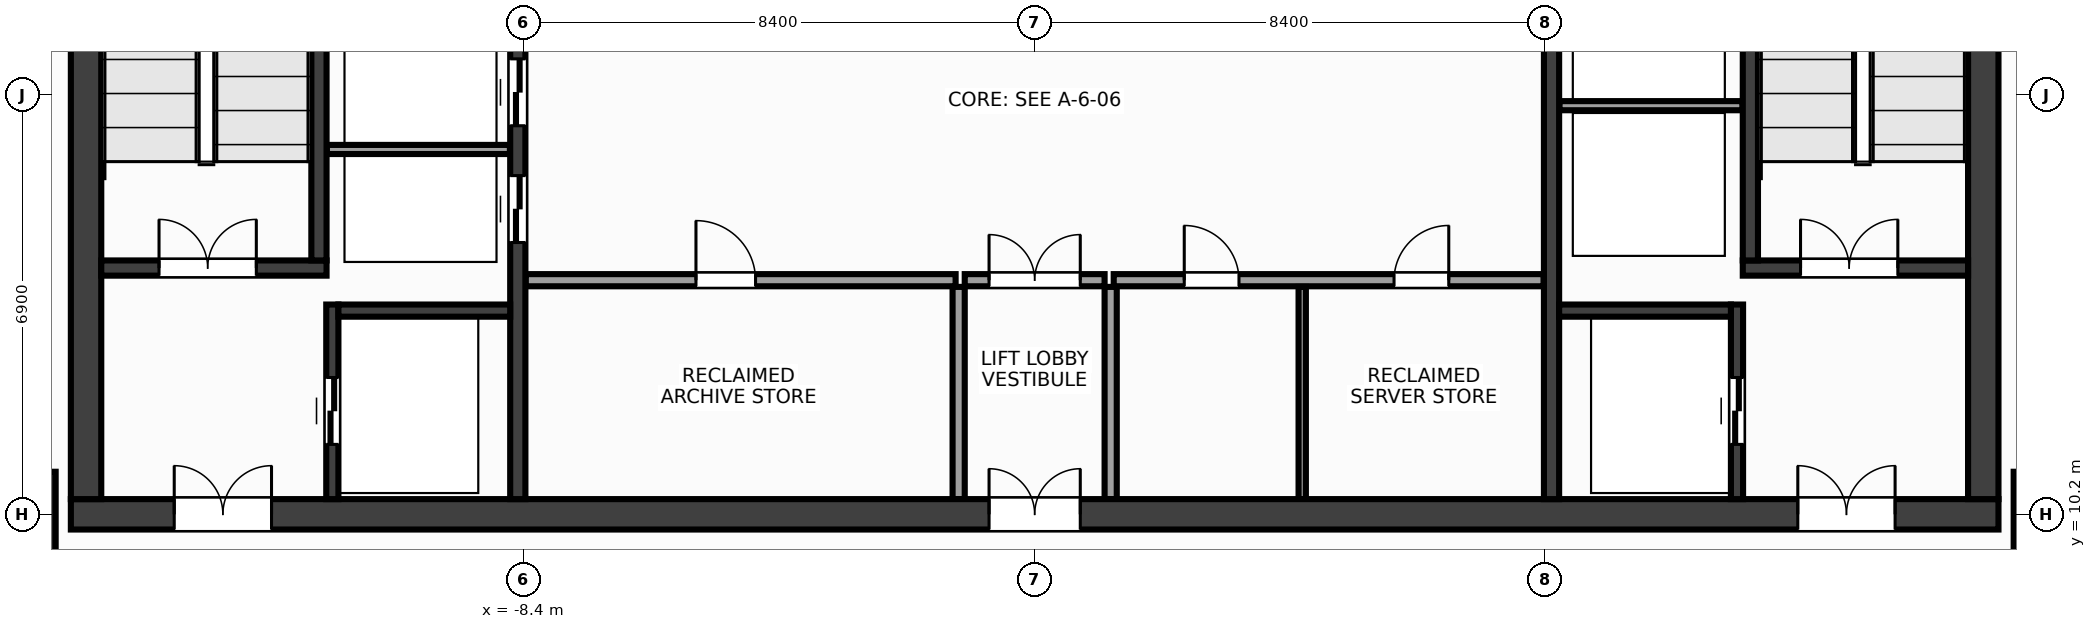
"""IFC4 building model, lengths in metres.
Left out: names, types, materials, properties, quantities, classifications, styles, units other than length and angle.
Written with IfcOpenShell. Run it as: python <this file> out.ifc"""

import sys

from ifc_helpers import new_model, si_unit, direction, frame, frame_2d, origin, origin_2d, place, context, subcontext, project, spatial, rectangle, extrude, source, transform, mapped, element, fill, save


model = new_model("IFC4")
c1 = context("Model", 3, precision=1e-05, world=origin(), true_north=direction((0.0, 1.0)))
c2 = subcontext(c1, "Body", "Model", "MODEL_VIEW")
j1 = project(units=[si_unit("LENGTHUNIT", "METRE"), si_unit("PLANEANGLEUNIT", "RADIAN")], contexts=[c1])
p1 = place(None, origin())
s1 = spatial("IfcSite", under=j1, at=p1, CompositionType="ELEMENT")
p2 = place(p1, origin())
s2 = spatial("IfcBuilding", under=s1, at=p2, CompositionType="ELEMENT")
p3 = place(p2, frame((0.0, 0.0, 218.0)))
s3 = spatial("IfcBuildingStorey", under=s2, at=p3, CompositionType="ELEMENT", Elevation=218.0)
m1 = source(origin(), c2, "Body", "SweptSolid", [
    extrude(rectangle(XDim=31.7, YDim=0.5, at=frame_2d((15.85, 0.0))), origin(), (0.0, 0.0, 1.0), 3.6),
])
p4 = place(p3, frame((-15.85, 10.2, 0.0), z_axis=(0.0, 0.0, 1.0), x_axis=(1.0, 0.0, 0.0)))
e1 = element("IfcWall", 1, at=p4, inside=s3, PredefinedType="SHEAR", context=c2, shape_type="MappedRepresentation", body=[
    mapped(m1, transform((0.0, 0.0, 0.0), x_axis=(1.0, 0.0, 0.0), y_axis=(0.0, 1.0, 0.0), z_axis=(0.0, 0.0, 1.0), scale=1.0)),
])
p5 = place(p4, frame((1.7, 0.0, 0.0)))
e2 = element("IfcOpeningElement", 2, at=p5, cuts=e1, PredefinedType="OPENING", context=c2, shape_type="SweptSolid", body=[
    extrude(rectangle(XDim=1.6, YDim=2.15, at=frame_2d((0.8, 1.075))), frame((0.0, 0.262, 0.0), z_axis=(0.0, -1.0, 0.0), x_axis=(1.0, 0.0, 0.0)), (0.0, 0.0, 1.0), 0.524),
])
p6 = place(p4, frame((28.4, 0.0, 0.0)))
e3 = element("IfcOpeningElement", 3, at=p6, cuts=e1, PredefinedType="OPENING", context=c2, shape_type="SweptSolid", body=[
    extrude(rectangle(XDim=1.6, YDim=2.15, at=frame_2d((0.8, 1.075))), frame((0.0, 0.262, 0.0), z_axis=(0.0, -1.0, 0.0), x_axis=(1.0, 0.0, 0.0)), (0.0, 0.0, 1.0), 0.524),
])
p7 = place(p4, frame((15.1, 0.0, 0.0)))
e4 = element("IfcOpeningElement", 4, at=p7, cuts=e1, PredefinedType="OPENING", context=c2, shape_type="SweptSolid", body=[
    extrude(rectangle(XDim=1.5, YDim=2.2, at=frame_2d((0.75, 1.1))), frame((0.0, 0.262, 0.0), z_axis=(0.0, -1.0, 0.0), x_axis=(1.0, 0.0, 0.0)), (0.0, 0.0, 1.0), 0.524),
])
m2 = source(origin(), c2, "Body", "SweptSolid", [
    extrude(rectangle(XDim=13.1, YDim=0.5, at=frame_2d((6.55, 0.0))), origin(), (0.0, 0.0, 1.0), 3.6),
])
for number, where, z_axis, x_axis in (
    (5, (-15.6, 10.45, 0.0), (0.0, 0.0, 1.0), (0.0, 1.0, 0.0)),
    (6, (15.6, 10.45, 0.0), (0.0, 0.0, 1.0), (0.0, 1.0, 0.0)),
):
    element("IfcWall", number, at=place(p3, frame(where, z_axis=z_axis, x_axis=x_axis)), inside=s3, PredefinedType="SHEAR", context=c2, shape_type="MappedRepresentation", body=[
        mapped(m2, transform((0.0, 0.0, 0.0), x_axis=(1.0, 0.0, 0.0), y_axis=(0.0, 1.0, 0.0), z_axis=(0.0, 0.0, 1.0), scale=1.0)),
    ])
m3 = source(origin(), c2, "Body", "SweptSolid", [
    extrude(rectangle(XDim=13.1, YDim=0.25, at=frame_2d((6.55, 0.0))), origin(), (0.0, 0.0, 1.0), 3.6),
])
p8 = place(p3, frame((-8.5, 10.45, 0.0), z_axis=(0.0, 0.0, 1.0), x_axis=(0.0, 1.0, 0.0)))
e7 = element("IfcWall", 7, at=p8, inside=s3, PredefinedType="SHEAR", context=c2, shape_type="MappedRepresentation", body=[
    mapped(m3, transform((0.0, 0.0, 0.0), x_axis=(1.0, 0.0, 0.0), y_axis=(0.0, 1.0, 0.0), z_axis=(0.0, 0.0, 1.0), scale=1.0)),
])
p9 = place(p8, frame((4.22, 0.0, 0.0)))
e8 = element("IfcOpeningElement", 8, at=p9, cuts=e7, PredefinedType="OPENING", context=c2, shape_type="SweptSolid", body=[
    extrude(rectangle(XDim=1.1, YDim=2.15, at=frame_2d((0.55, 1.075))), frame((0.0, 0.137, 0.0), z_axis=(0.0, -1.0, 0.0), x_axis=(1.0, 0.0, 0.0)), (0.0, 0.0, 1.0), 0.274),
])
p10 = place(p8, frame((6.14, 0.0, 0.0)))
e9 = element("IfcOpeningElement", 9, at=p10, cuts=e7, PredefinedType="OPENING", context=c2, shape_type="SweptSolid", body=[
    extrude(rectangle(XDim=1.1, YDim=2.15, at=frame_2d((0.55, 1.075))), frame((0.0, 0.137, 0.0), z_axis=(0.0, -1.0, 0.0), x_axis=(1.0, 0.0, 0.0)), (0.0, 0.0, 1.0), 0.274),
])
p11 = place(p8, frame((8.06, 0.0, 0.0)))
e10 = element("IfcOpeningElement", 10, at=p11, cuts=e7, PredefinedType="OPENING", context=c2, shape_type="SweptSolid", body=[
    extrude(rectangle(XDim=1.1, YDim=2.15, at=frame_2d((0.55, 1.075))), frame((0.0, 0.137, 0.0), z_axis=(0.0, -1.0, 0.0), x_axis=(1.0, 0.0, 0.0)), (0.0, 0.0, 1.0), 0.274),
])
p12 = place(p3, frame((8.5, 10.45, 0.0), z_axis=(0.0, 0.0, 1.0), x_axis=(0.0, 1.0, 0.0)))
e11 = element("IfcWall", 11, at=p12, inside=s3, PredefinedType="SHEAR", context=c2, shape_type="MappedRepresentation", body=[
    mapped(m3, transform((0.0, 0.0, 0.0), x_axis=(1.0, 0.0, 0.0), y_axis=(0.0, 1.0, 0.0), z_axis=(0.0, 0.0, 1.0), scale=1.0)),
])
p13 = place(p12, frame((10.0, 0.0, 0.0)))
e12 = element("IfcOpeningElement", 12, at=p13, cuts=e11, PredefinedType="OPENING", context=c2, shape_type="SweptSolid", body=[
    extrude(rectangle(XDim=0.95, YDim=2.15, at=frame_2d((0.475, 1.075))), frame((0.0, 0.137, 0.0), z_axis=(0.0, -1.0, 0.0), x_axis=(1.0, 0.0, 0.0)), (0.0, 0.0, 1.0), 0.274),
])
m4 = source(origin(), c2, "Body", "SweptSolid", [
    extrude(rectangle(XDim=3.705, YDim=0.25, at=frame_2d((1.853, 0.0))), origin(), (0.0, 0.0, 1.0), 3.6),
])
p14 = place(p3, frame((-15.35, 14.25, 0.0), z_axis=(0.0, 0.0, 1.0), x_axis=(1.0, 0.0, 0.0)))
e13 = element("IfcWall", 13, at=p14, inside=s3, PredefinedType="SHEAR", context=c2, shape_type="MappedRepresentation", body=[
    mapped(m4, transform((0.0, 0.0, 0.0), x_axis=(1.0, 0.0, 0.0), y_axis=(0.0, 1.0, 0.0), z_axis=(0.0, 0.0, 1.0), scale=1.0)),
])
p15 = place(p14, frame((0.95, 0.0, 0.0)))
e14 = element("IfcOpeningElement", 14, at=p15, cuts=e13, PredefinedType="OPENING", context=c2, shape_type="SweptSolid", body=[
    extrude(rectangle(XDim=1.6, YDim=2.15, at=frame_2d((0.8, 1.075))), frame((0.0, 0.137, 0.0), z_axis=(0.0, -1.0, 0.0), x_axis=(1.0, 0.0, 0.0)), (0.0, 0.0, 1.0), 0.274),
])
m5 = source(origin(), c2, "Body", "SweptSolid", [
    extrude(rectangle(XDim=9.175, YDim=0.25, at=frame_2d((4.587, 0.0))), origin(), (0.0, 0.0, 1.0), 3.6),
])
p16 = place(p3, frame((-11.77, 14.375, 0.0), z_axis=(0.0, 0.0, 1.0), x_axis=(0.0, 1.0, 0.0)))
e15 = element("IfcWall", 15, at=p16, inside=s3, PredefinedType="SHEAR", context=c2, shape_type="MappedRepresentation", body=[
    mapped(m5, transform((0.0, 0.0, 0.0), x_axis=(1.0, 0.0, 0.0), y_axis=(0.0, 1.0, 0.0), z_axis=(0.0, 0.0, 1.0), scale=1.0)),
])
p17 = place(p3, frame((11.645, 14.25, 0.0), z_axis=(0.0, 0.0, 1.0), x_axis=(1.0, 0.0, 0.0)))
e16 = element("IfcWall", 16, at=p17, inside=s3, PredefinedType="SHEAR", context=c2, shape_type="MappedRepresentation", body=[
    mapped(m4, transform((0.0, 0.0, 0.0), x_axis=(1.0, 0.0, 0.0), y_axis=(0.0, 1.0, 0.0), z_axis=(0.0, 0.0, 1.0), scale=1.0)),
])
p18 = place(p17, frame((0.95, 0.0, 0.0)))
e17 = element("IfcOpeningElement", 17, at=p18, cuts=e16, PredefinedType="OPENING", context=c2, shape_type="SweptSolid", body=[
    extrude(rectangle(XDim=1.6, YDim=2.15, at=frame_2d((0.8, 1.075))), frame((0.0, 0.137, 0.0), z_axis=(0.0, -1.0, 0.0), x_axis=(1.0, 0.0, 0.0)), (0.0, 0.0, 1.0), 0.274),
])
p19 = place(p3, frame((11.77, 14.375, 0.0), z_axis=(0.0, 0.0, 1.0), x_axis=(0.0, 1.0, 0.0)))
e18 = element("IfcWall", 18, at=p19, inside=s3, PredefinedType="SHEAR", context=c2, shape_type="MappedRepresentation", body=[
    mapped(m5, transform((0.0, 0.0, 0.0), x_axis=(1.0, 0.0, 0.0), y_axis=(0.0, 1.0, 0.0), z_axis=(0.0, 0.0, 1.0), scale=1.0)),
])
m6 = source(origin(), c2, "Body", "SweptSolid", [
    extrude(rectangle(XDim=3.2, YDim=0.2, at=frame_2d((1.6, 0.0))), origin(), (0.0, 0.0, 1.0), 3.6),
])
p20 = place(p3, frame((-11.55, 10.45, 0.0), z_axis=(0.0, 0.0, 1.0), x_axis=(0.0, 1.0, 0.0)))
e19 = element("IfcWall", 19, at=p20, inside=s3, PredefinedType="SHEAR", context=c2, shape_type="MappedRepresentation", body=[
    mapped(m6, transform((0.0, 0.0, 0.0), x_axis=(1.0, 0.0, 0.0), y_axis=(0.0, 1.0, 0.0), z_axis=(0.0, 0.0, 1.0), scale=1.0)),
])
p21 = place(p20, frame((0.9, 0.0, 0.0)))
e20 = element("IfcOpeningElement", 20, at=p21, cuts=e19, PredefinedType="OPENING", context=c2, shape_type="SweptSolid", body=[
    extrude(rectangle(XDim=1.1, YDim=2.15, at=frame_2d((0.55, 1.075))), frame((0.0, 0.112, 0.0), z_axis=(0.0, -1.0, 0.0), x_axis=(1.0, 0.0, 0.0)), (0.0, 0.0, 1.0), 0.224),
])
m7 = source(origin(), c2, "Body", "SweptSolid", [
    extrude(rectangle(XDim=2.825, YDim=0.2, at=frame_2d((1.413, 0.0))), origin(), (0.0, 0.0, 1.0), 3.6),
])
p22 = place(p3, frame((-11.45, 13.55, 0.0), z_axis=(0.0, 0.0, 1.0), x_axis=(1.0, 0.0, 0.0)))
e21 = element("IfcWall", 21, at=p22, inside=s3, PredefinedType="SHEAR", context=c2, shape_type="MappedRepresentation", body=[
    mapped(m7, transform((0.0, 0.0, 0.0), x_axis=(1.0, 0.0, 0.0), y_axis=(0.0, 1.0, 0.0), z_axis=(0.0, 0.0, 1.0), scale=1.0)),
])
p23 = place(p3, frame((11.55, 10.45, 0.0), z_axis=(0.0, 0.0, 1.0), x_axis=(0.0, 1.0, 0.0)))
e22 = element("IfcWall", 22, at=p23, inside=s3, PredefinedType="SHEAR", context=c2, shape_type="MappedRepresentation", body=[
    mapped(m6, transform((0.0, 0.0, 0.0), x_axis=(1.0, 0.0, 0.0), y_axis=(0.0, 1.0, 0.0), z_axis=(0.0, 0.0, 1.0), scale=1.0)),
])
p24 = place(p23, frame((0.9, 0.0, 0.0)))
e23 = element("IfcOpeningElement", 23, at=p24, cuts=e22, PredefinedType="OPENING", context=c2, shape_type="SweptSolid", body=[
    extrude(rectangle(XDim=1.1, YDim=2.15, at=frame_2d((0.55, 1.075))), frame((0.0, 0.112, 0.0), z_axis=(0.0, -1.0, 0.0), x_axis=(1.0, 0.0, 0.0)), (0.0, 0.0, 1.0), 0.224),
])
p25 = place(p3, frame((8.625, 13.55, 0.0), z_axis=(0.0, 0.0, 1.0), x_axis=(1.0, 0.0, 0.0)))
e24 = element("IfcWall", 24, at=p25, inside=s3, PredefinedType="SHEAR", context=c2, shape_type="MappedRepresentation", body=[
    mapped(m7, transform((0.0, 0.0, 0.0), x_axis=(1.0, 0.0, 0.0), y_axis=(0.0, 1.0, 0.0), z_axis=(0.0, 0.0, 1.0), scale=1.0)),
])
m8 = source(origin(), c2, "Body", "SweptSolid", [
    extrude(rectangle(XDim=1.4, YDim=1.4, at=origin_2d()), origin(), (0.0, 0.0, 1.0), 3.6),
])
for number, where, z_axis, x_axis in (
    (25, (-16.8, 10.2, 0.0), (0.0, 0.0, 1.0), (1.0, 0.0, 0.0)),
    (26, (16.8, 10.2, 0.0), (0.0, 0.0, 1.0), (1.0, 0.0, 0.0)),
):
    element("IfcColumn", number, at=place(p3, frame(where, z_axis=z_axis, x_axis=x_axis)), inside=s3, PredefinedType="COLUMN", context=c2, shape_type="MappedRepresentation", body=[
        mapped(m8, transform((0.0, 0.0, 0.0), x_axis=(1.0, 0.0, 0.0), y_axis=(0.0, 1.0, 0.0), z_axis=(0.0, 0.0, 1.0), scale=1.0)),
    ])
m9 = source(origin(), c2, "Body", "SweptSolid", [
    extrude(rectangle(XDim=3.01, YDim=0.15, at=frame_2d((1.505, 0.0))), origin(), (0.0, 0.0, 1.0), 3.38),
])
for number, where, z_axis, x_axis in (
    (27, (-11.64, 16.2, 0.0), (0.0, 0.0, 1.0), (1.0, 0.0, 0.0)),
    (28, (8.63, 16.92, 0.0), (0.0, 0.0, 1.0), (1.0, 0.0, 0.0)),
):
    element("IfcWall", number, at=place(p3, frame(where, z_axis=z_axis, x_axis=x_axis)), inside=s3, PredefinedType="PARTITIONING", context=c2, shape_type="MappedRepresentation", body=[
        mapped(m9, transform((0.0, 0.0, 0.0), x_axis=(1.0, 0.0, 0.0), y_axis=(0.0, 1.0, 0.0), z_axis=(0.0, 0.0, 1.0), scale=1.0)),
    ])
m10 = source(origin(), c2, "Body", "SweptSolid", [
    extrude(rectangle(XDim=7.07, YDim=0.2, at=frame_2d((3.535, 0.0))), origin(), (0.0, 0.0, 1.0), 3.38),
])
p26 = place(p3, frame((-8.37, 14.05, 0.0), z_axis=(0.0, 0.0, 1.0), x_axis=(1.0, 0.0, 0.0)))
e29 = element("IfcWall", 29, at=p26, inside=s3, PredefinedType="PARTITIONING", context=c2, shape_type="MappedRepresentation", body=[
    mapped(m10, transform((0.0, 0.0, 0.0), x_axis=(1.0, 0.0, 0.0), y_axis=(0.0, 1.0, 0.0), z_axis=(0.0, 0.0, 1.0), scale=1.0)),
])
p27 = place(p26, frame((2.8, 0.0, 0.0)))
e30 = element("IfcOpeningElement", 30, at=p27, cuts=e29, PredefinedType="OPENING", context=c2, shape_type="SweptSolid", body=[
    extrude(rectangle(XDim=0.98, YDim=2.15, at=frame_2d((0.49, 1.075))), frame((0.0, 0.112, 0.0), z_axis=(0.0, -1.0, 0.0), x_axis=(1.0, 0.0, 0.0)), (0.0, 0.0, 1.0), 0.224),
])
p28 = place(p3, frame((1.3, 14.05, 0.0), z_axis=(0.0, 0.0, 1.0), x_axis=(1.0, 0.0, 0.0)))
e31 = element("IfcWall", 31, at=p28, inside=s3, PredefinedType="PARTITIONING", context=c2, shape_type="MappedRepresentation", body=[
    mapped(m10, transform((0.0, 0.0, 0.0), x_axis=(1.0, 0.0, 0.0), y_axis=(0.0, 1.0, 0.0), z_axis=(0.0, 0.0, 1.0), scale=1.0)),
])
p29 = place(p28, frame((1.16, 0.0, 0.0)))
e32 = element("IfcOpeningElement", 32, at=p29, cuts=e31, PredefinedType="OPENING", context=c2, shape_type="SweptSolid", body=[
    extrude(rectangle(XDim=0.9, YDim=2.15, at=frame_2d((0.45, 1.075))), frame((0.0, 0.112, 0.0), z_axis=(0.0, -1.0, 0.0), x_axis=(1.0, 0.0, 0.0)), (0.0, 0.0, 1.0), 0.224),
])
p30 = place(p28, frame((4.61, 0.0, 0.0)))
e33 = element("IfcOpeningElement", 33, at=p30, cuts=e31, PredefinedType="OPENING", context=c2, shape_type="SweptSolid", body=[
    extrude(rectangle(XDim=0.9, YDim=2.15, at=frame_2d((0.45, 1.075))), frame((0.0, 0.112, 0.0), z_axis=(0.0, -1.0, 0.0), x_axis=(1.0, 0.0, 0.0)), (0.0, 0.0, 1.0), 0.224),
])
m11 = source(origin(), c2, "Body", "SweptSolid", [
    extrude(rectangle(XDim=3.49, YDim=0.2, at=frame_2d((1.745, 0.0))), origin(), (0.0, 0.0, 1.0), 3.38),
])
for number, where, z_axis, x_axis in (
    (34, (-1.25, 10.45, 0.0), (0.0, 0.0, 1.0), (0.0, 1.0, 0.0)),
    (35, (1.25, 10.45, 0.0), (0.0, 0.0, 1.0), (0.0, 1.0, 0.0)),
):
    element("IfcWall", number, at=place(p3, frame(where, z_axis=z_axis, x_axis=x_axis)), inside=s3, PredefinedType="PARTITIONING", context=c2, shape_type="MappedRepresentation", body=[
        mapped(m11, transform((0.0, 0.0, 0.0), x_axis=(1.0, 0.0, 0.0), y_axis=(0.0, 1.0, 0.0), z_axis=(0.0, 0.0, 1.0), scale=1.0)),
    ])
m12 = source(origin(), c2, "Body", "SweptSolid", [
    extrude(rectangle(XDim=2.3, YDim=0.2, at=frame_2d((1.15, 0.0))), origin(), (0.0, 0.0, 1.0), 3.38),
])
p31 = place(p3, frame((-1.15, 14.05, 0.0), z_axis=(0.0, 0.0, 1.0), x_axis=(1.0, 0.0, 0.0)))
e36 = element("IfcWall", 36, at=p31, inside=s3, PredefinedType="PARTITIONING", context=c2, shape_type="MappedRepresentation", body=[
    mapped(m12, transform((0.0, 0.0, 0.0), x_axis=(1.0, 0.0, 0.0), y_axis=(0.0, 1.0, 0.0), z_axis=(0.0, 0.0, 1.0), scale=1.0)),
])
p32 = place(p31, frame((0.4, 0.0, 0.0)))
e37 = element("IfcOpeningElement", 37, at=p32, cuts=e36, PredefinedType="OPENING", context=c2, shape_type="SweptSolid", body=[
    extrude(rectangle(XDim=1.5, YDim=2.2, at=frame_2d((0.75, 1.1))), frame((0.0, 0.112, 0.0), z_axis=(0.0, -1.0, 0.0), x_axis=(1.0, 0.0, 0.0)), (0.0, 0.0, 1.0), 0.224),
])
m13 = source(origin(), c2, "Body", "SweptSolid", [
    extrude(rectangle(XDim=3.49, YDim=0.12, at=frame_2d((1.745, 0.0))), origin(), (0.0, 0.0, 1.0), 3.38),
])
p33 = place(p3, frame((4.4, 10.45, 0.0), z_axis=(0.0, 0.0, 1.0), x_axis=(0.0, 1.0, 0.0)))
e38 = element("IfcWall", 38, at=p33, inside=s3, PredefinedType="PARTITIONING", context=c2, shape_type="MappedRepresentation", body=[
    mapped(m13, transform((0.0, 0.0, 0.0), x_axis=(1.0, 0.0, 0.0), y_axis=(0.0, 1.0, 0.0), z_axis=(0.0, 0.0, 1.0), scale=1.0)),
])
m14 = source(origin(), c2, "Body", "SweptSolid", [
    extrude(rectangle(XDim=1.6, YDim=2.15, at=frame_2d((0.8, 1.075))), frame((0.0, 0.025, 0.0), z_axis=(0.0, -1.0, 0.0), x_axis=(1.0, 0.0, 0.0)), (0.0, 0.0, 1.0), 0.05),
])
p34 = place(p15, origin())
e39 = element("IfcDoor", 39, at=p34, inside=s3, OperationType="DOUBLE_DOOR_SINGLE_SWING", PredefinedType="DOOR", context=c2, shape_type="MappedRepresentation", body=[
    mapped(m14, transform((0.0, 0.0, 0.0), x_axis=(1.0, 0.0, 0.0), y_axis=(0.0, 1.0, 0.0), z_axis=(0.0, 0.0, 1.0), scale=1.0)),
])
fill(e14, e39)
p35 = place(p18, origin())
e40 = element("IfcDoor", 40, at=p35, inside=s3, OperationType="DOUBLE_DOOR_SINGLE_SWING", PredefinedType="DOOR", context=c2, shape_type="MappedRepresentation", body=[
    mapped(m14, transform((0.0, 0.0, 0.0), x_axis=(1.0, 0.0, 0.0), y_axis=(0.0, 1.0, 0.0), z_axis=(0.0, 0.0, 1.0), scale=1.0)),
])
fill(e17, e40)
p36 = place(p5, origin())
e41 = element("IfcDoor", 41, at=p36, inside=s3, OperationType="DOUBLE_DOOR_SINGLE_SWING", PredefinedType="DOOR", context=c2, shape_type="MappedRepresentation", body=[
    mapped(m14, transform((0.0, 0.0, 0.0), x_axis=(1.0, 0.0, 0.0), y_axis=(0.0, 1.0, 0.0), z_axis=(0.0, 0.0, 1.0), scale=1.0)),
])
fill(e2, e41)
p37 = place(p6, origin())
e42 = element("IfcDoor", 42, at=p37, inside=s3, OperationType="DOUBLE_DOOR_SINGLE_SWING", PredefinedType="DOOR", context=c2, shape_type="MappedRepresentation", body=[
    mapped(m14, transform((0.0, 0.0, 0.0), x_axis=(1.0, 0.0, 0.0), y_axis=(0.0, 1.0, 0.0), z_axis=(0.0, 0.0, 1.0), scale=1.0)),
])
fill(e3, e42)
m15 = source(origin(), c2, "Body", "SweptSolid", [
    extrude(rectangle(XDim=1.1, YDim=2.15, at=frame_2d((0.55, 1.075))), frame((0.0, 0.025, 0.0), z_axis=(0.0, -1.0, 0.0), x_axis=(1.0, 0.0, 0.0)), (0.0, 0.0, 1.0), 0.05),
])
p38 = place(p21, origin())
e43 = element("IfcDoor", 43, at=p38, inside=s3, OperationType="DOUBLE_DOOR_SLIDING", PredefinedType="DOOR", context=c2, shape_type="MappedRepresentation", body=[
    mapped(m15, transform((0.0, 0.0, 0.0), x_axis=(1.0, 0.0, 0.0), y_axis=(0.0, 1.0, 0.0), z_axis=(0.0, 0.0, 1.0), scale=1.0)),
])
fill(e20, e43)
p39 = place(p24, origin())
e44 = element("IfcDoor", 44, at=p39, inside=s3, OperationType="DOUBLE_DOOR_SLIDING", PredefinedType="DOOR", context=c2, shape_type="MappedRepresentation", body=[
    mapped(m15, transform((0.0, 0.0, 0.0), x_axis=(1.0, 0.0, 0.0), y_axis=(0.0, 1.0, 0.0), z_axis=(0.0, 0.0, 1.0), scale=1.0)),
])
fill(e23, e44)
p40 = place(p9, origin())
e45 = element("IfcDoor", 45, at=p40, inside=s3, OperationType="DOUBLE_DOOR_SLIDING", PredefinedType="DOOR", context=c2, shape_type="MappedRepresentation", body=[
    mapped(m15, transform((0.0, 0.0, 0.0), x_axis=(1.0, 0.0, 0.0), y_axis=(0.0, 1.0, 0.0), z_axis=(0.0, 0.0, 1.0), scale=1.0)),
])
fill(e8, e45)
p41 = place(p10, origin())
e46 = element("IfcDoor", 46, at=p41, inside=s3, OperationType="DOUBLE_DOOR_SLIDING", PredefinedType="DOOR", context=c2, shape_type="MappedRepresentation", body=[
    mapped(m15, transform((0.0, 0.0, 0.0), x_axis=(1.0, 0.0, 0.0), y_axis=(0.0, 1.0, 0.0), z_axis=(0.0, 0.0, 1.0), scale=1.0)),
])
fill(e9, e46)
m16 = source(origin(), c2, "Body", "SweptSolid", [
    extrude(rectangle(XDim=0.98, YDim=2.15, at=frame_2d((0.49, 1.075))), frame((0.0, 0.025, 0.0), z_axis=(0.0, -1.0, 0.0), x_axis=(1.0, 0.0, 0.0)), (0.0, 0.0, 1.0), 0.05),
])
p42 = place(p27, origin())
e47 = element("IfcDoor", 47, at=p42, inside=s3, OperationType="SINGLE_SWING_LEFT", PredefinedType="DOOR", context=c2, shape_type="MappedRepresentation", body=[
    mapped(m16, transform((0.0, 0.0, 0.0), x_axis=(1.0, 0.0, 0.0), y_axis=(0.0, 1.0, 0.0), z_axis=(0.0, 0.0, 1.0), scale=1.0)),
])
fill(e30, e47)
m17 = source(origin(), c2, "Body", "SweptSolid", [
    extrude(rectangle(XDim=0.9, YDim=2.15, at=frame_2d((0.45, 1.075))), frame((0.0, 0.025, 0.0), z_axis=(0.0, -1.0, 0.0), x_axis=(1.0, 0.0, 0.0)), (0.0, 0.0, 1.0), 0.05),
])
p43 = place(p29, origin())
e48 = element("IfcDoor", 48, at=p43, inside=s3, OperationType="SINGLE_SWING_LEFT", PredefinedType="DOOR", context=c2, shape_type="MappedRepresentation", body=[
    mapped(m17, transform((0.0, 0.0, 0.0), x_axis=(1.0, 0.0, 0.0), y_axis=(0.0, 1.0, 0.0), z_axis=(0.0, 0.0, 1.0), scale=1.0)),
])
fill(e32, e48)
p44 = place(p30, origin())
e49 = element("IfcDoor", 49, at=p44, inside=s3, OperationType="SINGLE_SWING_RIGHT", PredefinedType="DOOR", context=c2, shape_type="MappedRepresentation", body=[
    mapped(m17, transform((0.0, 0.0, 0.0), x_axis=(1.0, 0.0, 0.0), y_axis=(0.0, 1.0, 0.0), z_axis=(0.0, 0.0, 1.0), scale=1.0)),
])
fill(e33, e49)
m18 = source(origin(), c2, "Body", "SweptSolid", [
    extrude(rectangle(XDim=1.5, YDim=2.2, at=frame_2d((0.75, 1.1))), frame((0.0, 0.025, 0.0), z_axis=(0.0, -1.0, 0.0), x_axis=(1.0, 0.0, 0.0)), (0.0, 0.0, 1.0), 0.05),
])
p45 = place(p32, origin())
e50 = element("IfcDoor", 50, at=p45, inside=s3, OperationType="DOUBLE_DOOR_SINGLE_SWING", PredefinedType="DOOR", context=c2, shape_type="MappedRepresentation", body=[
    mapped(m18, transform((0.0, 0.0, 0.0), x_axis=(1.0, 0.0, 0.0), y_axis=(0.0, 1.0, 0.0), z_axis=(0.0, 0.0, 1.0), scale=1.0)),
])
fill(e37, e50)
p46 = place(p7, origin())
e51 = element("IfcDoor", 51, at=p46, inside=s3, OperationType="DOUBLE_DOOR_SINGLE_SWING", PredefinedType="DOOR", context=c2, shape_type="MappedRepresentation", body=[
    mapped(m18, transform((0.0, 0.0, 0.0), x_axis=(1.0, 0.0, 0.0), y_axis=(0.0, 1.0, 0.0), z_axis=(0.0, 0.0, 1.0), scale=1.0)),
])
fill(e4, e51)
save(model, sys.argv[1])
